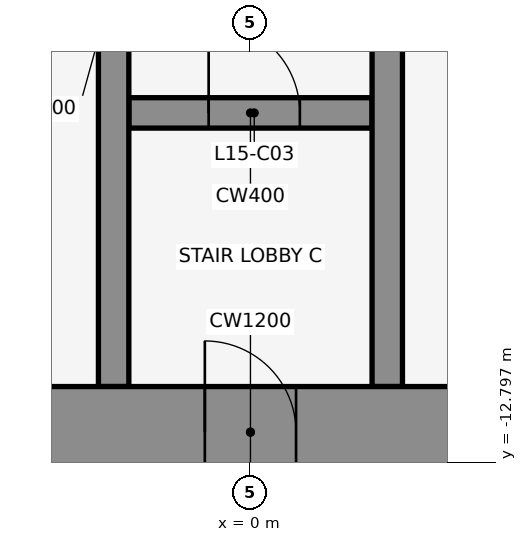
"""IFC4 building model, lengths in metres.
Left out: names, types, materials, properties, quantities, classifications, styles, units other than length and angle.
Written with IfcOpenShell. Run it as: python <this file> out.ifc"""

import sys

from ifc_helpers import new_model, si_unit, direction, frame, frame_2d, origin, place, context, subcontext, project, spatial, rectangle, extrude, element, fill, save


model = new_model("IFC4")
c1 = context("Model", 3, precision=1e-05, world=origin(), true_north=direction((0.0, 1.0)))
c2 = subcontext(c1, "Body", "Model", "MODEL_VIEW")
j1 = project(units=[si_unit("LENGTHUNIT", "METRE"), si_unit("PLANEANGLEUNIT", "RADIAN")], contexts=[c1])
p1 = place(None, origin())
s1 = spatial("IfcSite", under=j1, at=p1, CompositionType="ELEMENT")
p2 = place(p1, origin())
s2 = spatial("IfcBuilding", under=s1, at=p2, CompositionType="ELEMENT")
p3 = place(p2, frame((0.0, 0.0, 75.5)))
s3 = spatial("IfcBuildingStorey", under=s2, at=p3, CompositionType="ELEMENT", Elevation=75.5)
p4 = place(p3, frame((-1.6, -8.2, 0.0), z_axis=(0.0, 0.0, 1.0), x_axis=(1.0, 0.0, 0.0)))
e1 = element("IfcWall", 1, at=p4, inside=s3, PredefinedType="SHEAR", context=c2, shape_type="SweptSolid", body=[
    extrude(rectangle(XDim=3.2, YDim=0.4, at=frame_2d((1.6, 0.0))), origin(), (0.0, 0.0, 1.0), 4.5),
])
p5 = place(p4, frame((1.05, 0.0, 0.0)))
e2 = element("IfcOpeningElement", 2, at=p5, cuts=e1, PredefinedType="OPENING", context=c2, shape_type="SweptSolid", body=[
    extrude(rectangle(XDim=1.2, YDim=2.1, at=frame_2d((0.6, 1.05))), frame((0.0, 0.212, 0.0), z_axis=(0.0, -1.0, 0.0), x_axis=(1.0, 0.0, 0.0)), (0.0, 0.0, 1.0), 0.424),
])
for number, where, z_axis, x_axis in (
    (3, (-1.8, -11.8, 0.0), (0.0, 0.0, 1.0), (0.0, 1.0, 0.0)),
    (4, (1.8, -11.8, 0.0), (0.0, 0.0, 1.0), (0.0, 1.0, 0.0)),
):
    element("IfcWall", number, at=place(p3, frame(where, z_axis=z_axis, x_axis=x_axis)), inside=s3, PredefinedType="SHEAR", context=c2, shape_type="SweptSolid", body=[
        extrude(rectangle(XDim=10.6, YDim=0.4, at=frame_2d((5.3, 0.0))), origin(), (0.0, 0.0, 1.0), 4.5),
    ])
p6 = place(p3, frame((-22.0, -12.4, 0.0), z_axis=(0.0, 0.0, 1.0), x_axis=(1.0, 0.0, 0.0)))
e5 = element("IfcWall", 5, at=p6, inside=s3, PredefinedType="SHEAR", context=c2, shape_type="SweptSolid", body=[
    extrude(rectangle(XDim=44.0, YDim=1.2, at=frame_2d((22.0, 0.0))), origin(), (0.0, 0.0, 1.0), 4.5),
])
p7 = place(p6, frame((2.2, 0.0, 0.0)))
e6 = element("IfcOpeningElement", 6, at=p7, cuts=e5, PredefinedType="OPENING", context=c2, shape_type="SweptSolid", body=[
    extrude(rectangle(XDim=1.2, YDim=2.1, at=frame_2d((0.6, 1.05))), frame((0.0, 0.612, 0.0), z_axis=(0.0, -1.0, 0.0), x_axis=(1.0, 0.0, 0.0)), (0.0, 0.0, 1.0), 1.224),
])
p8 = place(p6, frame((21.4, 0.0, 0.0)))
e7 = element("IfcOpeningElement", 7, at=p8, cuts=e5, PredefinedType="OPENING", context=c2, shape_type="SweptSolid", body=[
    extrude(rectangle(XDim=1.2, YDim=2.1, at=frame_2d((0.6, 1.05))), frame((0.0, 0.612, 0.0), z_axis=(0.0, -1.0, 0.0), x_axis=(1.0, 0.0, 0.0)), (0.0, 0.0, 1.0), 1.224),
])
p9 = place(p6, frame((40.6, 0.0, 0.0)))
e8 = element("IfcOpeningElement", 8, at=p9, cuts=e5, PredefinedType="OPENING", context=c2, shape_type="SweptSolid", body=[
    extrude(rectangle(XDim=1.2, YDim=2.1, at=frame_2d((0.6, 1.05))), frame((0.0, 0.612, 0.0), z_axis=(0.0, -1.0, 0.0), x_axis=(1.0, 0.0, 0.0)), (0.0, 0.0, 1.0), 1.224),
])
p10 = place(p6, frame((16.0, 0.0, 0.0)))
e9 = element("IfcOpeningElement", 9, at=p10, cuts=e5, PredefinedType="OPENING", context=c2, shape_type="SweptSolid", body=[
    extrude(rectangle(XDim=1.8, YDim=2.1, at=frame_2d((0.9, 1.05))), frame((0.0, 0.612, 0.0), z_axis=(0.0, -1.0, 0.0), x_axis=(1.0, 0.0, 0.0)), (0.0, 0.0, 1.0), 1.224),
])
p11 = place(p6, frame((6.3, 0.0, 0.0)))
e10 = element("IfcOpeningElement", 10, at=p11, cuts=e5, PredefinedType="OPENING", context=c2, shape_type="SweptSolid", body=[
    extrude(rectangle(XDim=1.2, YDim=2.1, at=frame_2d((0.6, 1.05))), frame((0.0, 0.612, 0.0), z_axis=(0.0, -1.0, 0.0), x_axis=(1.0, 0.0, 0.0)), (0.0, 0.0, 1.0), 1.224),
])
p12 = place(p6, frame((26.2, 0.0, 0.0)))
e11 = element("IfcOpeningElement", 11, at=p12, cuts=e5, PredefinedType="OPENING", context=c2, shape_type="SweptSolid", body=[
    extrude(rectangle(XDim=1.8, YDim=2.1, at=frame_2d((0.9, 1.05))), frame((0.0, 0.612, 0.0), z_axis=(0.0, -1.0, 0.0), x_axis=(1.0, 0.0, 0.0)), (0.0, 0.0, 1.0), 1.224),
])
p13 = place(p6, frame((36.5, 0.0, 0.0)))
e12 = element("IfcOpeningElement", 12, at=p13, cuts=e5, PredefinedType="OPENING", context=c2, shape_type="SweptSolid", body=[
    extrude(rectangle(XDim=1.2, YDim=2.1, at=frame_2d((0.6, 1.05))), frame((0.0, 0.612, 0.0), z_axis=(0.0, -1.0, 0.0), x_axis=(1.0, 0.0, 0.0)), (0.0, 0.0, 1.0), 1.224),
])
p14 = place(p5, origin())
e13 = element("IfcDoor", 13, at=p14, inside=s3, OperationType="SINGLE_SWING_LEFT", PredefinedType="DOOR", context=c2, shape_type="SweptSolid", body=[
    extrude(rectangle(XDim=1.2, YDim=2.1, at=frame_2d((0.6, 1.05))), frame((0.0, 0.025, 0.0), z_axis=(0.0, -1.0, 0.0), x_axis=(1.0, 0.0, 0.0)), (0.0, 0.0, 1.0), 0.05),
])
fill(e2, e13)
p15 = place(p8, frame((1.2, 0.0, 0.0), z_axis=(0.0, 0.0, 1.0), x_axis=(-1.0, 0.0, 0.0)))
e14 = element("IfcDoor", 14, at=p15, inside=s3, OperationType="SINGLE_SWING_RIGHT", PredefinedType="DOOR", context=c2, shape_type="SweptSolid", body=[
    extrude(rectangle(XDim=1.2, YDim=2.1, at=frame_2d((0.6, 1.05))), frame((0.0, 0.025, 0.0), z_axis=(0.0, -1.0, 0.0), x_axis=(1.0, 0.0, 0.0)), (0.0, 0.0, 1.0), 0.05),
])
fill(e7, e14)
save(model, sys.argv[1])
